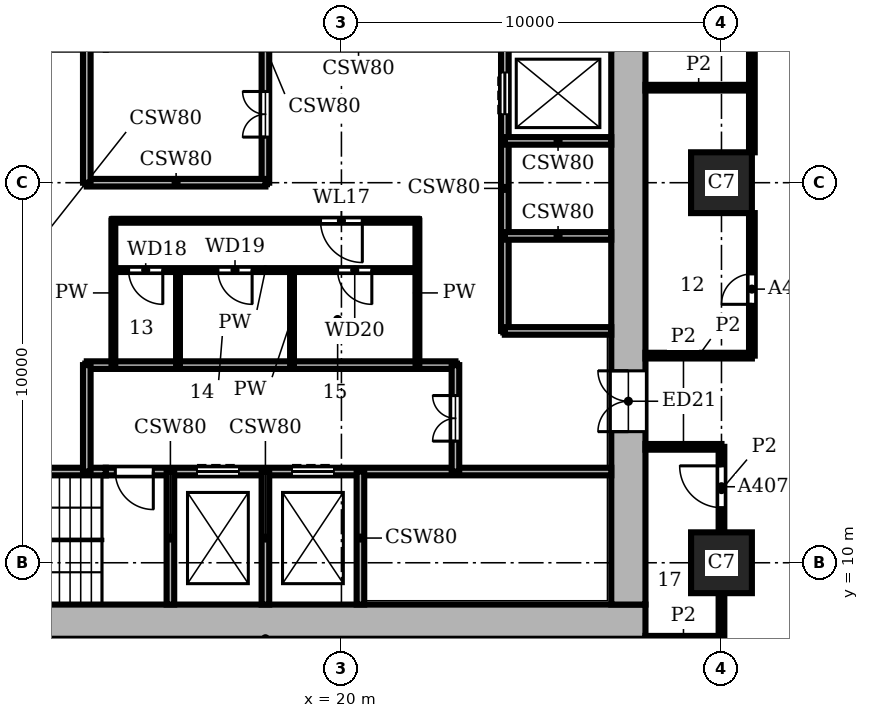
"""IFC4 building model, lengths in metres.
Left out: names, types, materials, properties, quantities, classifications, styles, units other than length and angle.
Written with IfcOpenShell. Run it as: python <this file> out.ifc"""

import sys

from ifc_helpers import new_model, si_unit, direction, frame, frame_2d, origin, origin_2d, place, context, subcontext, project, spatial, rectangle, extrude, element, fill, save


model = new_model("IFC4")
c1 = context("Model", 3, precision=1e-05, world=origin(), true_north=direction((0.0, 1.0)))
c2 = subcontext(c1, "Body", "Model", "MODEL_VIEW")
j1 = project(units=[si_unit("LENGTHUNIT", "METRE"), si_unit("PLANEANGLEUNIT", "RADIAN")], contexts=[c1])
p1 = place(None, origin())
s1 = spatial("IfcSite", under=j1, at=p1, CompositionType="ELEMENT")
p2 = place(p1, origin())
s2 = spatial("IfcBuilding", under=s1, at=p2, CompositionType="ELEMENT")
p3 = place(p2, frame((0.0, 0.0, 47.1)))
s3 = spatial("IfcBuildingStorey", under=s2, at=p3, CompositionType="ELEMENT", Elevation=47.1)
for number, where, z_axis, x_axis in (
    (1, (30.0, 10.0, 0.0), (0.0, 0.0, 1.0), (1.0, 0.0, 0.0)),
    (2, (30.0, 20.0, 0.0), (0.0, 0.0, 1.0), (1.0, 0.0, 0.0)),
):
    element("IfcColumn", number, at=place(p3, frame(where, z_axis=z_axis, x_axis=x_axis)), inside=s3, PredefinedType="COLUMN", context=c2, shape_type="SweptSolid", body=[
        extrude(rectangle(XDim=1.6, YDim=1.6, at=origin_2d()), origin(), (0.0, 0.0, 1.0), 3.9),
    ])
p4 = place(p3, frame((8.0, 8.45, 0.0), z_axis=(0.0, 0.0, 1.0), x_axis=(1.0, 0.0, 0.0)))
e3 = element("IfcWall", 3, at=p4, inside=s3, PredefinedType="SHEAR", context=c2, shape_type="SweptSolid", body=[
    extrude(rectangle(XDim=20.0, YDim=0.9, at=frame_2d((10.0, 0.0))), origin(), (0.0, 0.0, 1.0), 3.9),
])
p5 = place(p3, frame((27.55, 8.9, 0.0), z_axis=(0.0, 0.0, 1.0), x_axis=(0.0, 1.0, 0.0)))
e4 = element("IfcWall", 4, at=p5, inside=s3, PredefinedType="SHEAR", context=c2, shape_type="SweptSolid", body=[
    extrude(rectangle(XDim=18.2, YDim=0.9, at=frame_2d((9.1, 0.0))), origin(), (0.0, 0.0, 1.0), 3.9),
])
p6 = place(p5, frame((4.55, 0.0, 0.0)))
e5 = element("IfcOpeningElement", 5, at=p6, cuts=e4, PredefinedType="OPENING", context=c2, shape_type="SweptSolid", body=[
    extrude(rectangle(XDim=1.6, YDim=2.1, at=frame_2d((0.8, 1.05))), frame((0.0, 0.46, 0.0), z_axis=(0.0, -1.0, 0.0), x_axis=(1.0, 0.0, 0.0)), (0.0, 0.0, 1.0), 0.92),
])
p7 = place(p3, frame((8.9, 12.4, 0.0), z_axis=(0.0, 0.0, 1.0), x_axis=(1.0, 0.0, 0.0)))
e6 = element("IfcWall", 6, at=p7, inside=s3, PredefinedType="SHEAR", context=c2, shape_type="SweptSolid", body=[
    extrude(rectangle(XDim=4.9, YDim=0.2, at=frame_2d((2.45, 0.0))), origin(), (0.0, 0.0, 1.0), 3.58),
])
p8 = place(p3, frame((13.8, 12.4, 0.0), z_axis=(0.0, 0.0, 1.0), x_axis=(1.0, 0.0, 0.0)))
e7 = element("IfcWall", 7, at=p8, inside=s3, PredefinedType="SHEAR", context=c2, shape_type="SweptSolid", body=[
    extrude(rectangle(XDim=13.3, YDim=0.2, at=frame_2d((6.65, 0.0))), origin(), (0.0, 0.0, 1.0), 3.58),
])
p9 = place(p8, frame((2.4, 0.0, 0.0)))
e8 = element("IfcOpeningElement", 8, at=p9, cuts=e7, PredefinedType="OPENING", context=c2, shape_type="SweptSolid", body=[
    extrude(rectangle(XDim=1.1, YDim=2.1, at=frame_2d((0.55, 1.05))), frame((0.0, 0.11, 0.0), z_axis=(0.0, -1.0, 0.0), x_axis=(1.0, 0.0, 0.0)), (0.0, 0.0, 1.0), 0.22),
])
p10 = place(p8, frame((4.9, 0.0, 0.0)))
e9 = element("IfcOpeningElement", 9, at=p10, cuts=e7, PredefinedType="OPENING", context=c2, shape_type="SweptSolid", body=[
    extrude(rectangle(XDim=1.1, YDim=2.1, at=frame_2d((0.55, 1.05))), frame((0.0, 0.11, 0.0), z_axis=(0.0, -1.0, 0.0), x_axis=(1.0, 0.0, 0.0)), (0.0, 0.0, 1.0), 0.22),
])
p11 = place(p8, frame((0.25, 0.0, 0.0)))
e10 = element("IfcOpeningElement", 10, at=p11, cuts=e7, PredefinedType="OPENING", context=c2, shape_type="SweptSolid", body=[
    extrude(rectangle(XDim=1.0, YDim=2.1, at=frame_2d((0.5, 1.05))), frame((0.0, 0.11, 0.0), z_axis=(0.0, -1.0, 0.0), x_axis=(1.0, 0.0, 0.0)), (0.0, 0.0, 1.0), 0.22),
])
p12 = place(p3, frame((13.3, 15.2, 0.0), z_axis=(0.0, 0.0, 1.0), x_axis=(1.0, 0.0, 0.0)))
e11 = element("IfcWall", 11, at=p12, inside=s3, PredefinedType="SHEAR", context=c2, shape_type="SweptSolid", body=[
    extrude(rectangle(XDim=9.7, YDim=0.2, at=frame_2d((4.85, 0.0))), origin(), (0.0, 0.0, 1.0), 3.58),
])
p13 = place(p3, frame((24.3, 16.1, 0.0), z_axis=(0.0, 0.0, 1.0), x_axis=(1.0, 0.0, 0.0)))
e12 = element("IfcWall", 12, at=p13, inside=s3, PredefinedType="SHEAR", context=c2, shape_type="SweptSolid", body=[
    extrude(rectangle(XDim=2.8, YDim=0.2, at=frame_2d((1.4, 0.0))), origin(), (0.0, 0.0, 1.0), 3.58),
])
p14 = place(p3, frame((14.0, 17.7, 0.0), z_axis=(0.0, 0.0, 1.0), x_axis=(1.0, 0.0, 0.0)))
e13 = element("IfcWall", 13, at=p14, inside=s3, PredefinedType="PARTITIONING", context=c2, shape_type="SweptSolid", body=[
    extrude(rectangle(XDim=8.0, YDim=0.1, at=frame_2d((4.0, 0.0))), origin(), (0.0, 0.0, 1.0), 3.58),
])
p15 = place(p14, frame((0.4, 0.0, 0.0)))
e14 = element("IfcOpeningElement", 14, at=p15, cuts=e13, PredefinedType="OPENING", context=c2, shape_type="SweptSolid", body=[
    extrude(rectangle(XDim=0.9, YDim=2.1, at=frame_2d((0.45, 1.05))), frame((0.0, 0.06, 0.0), z_axis=(0.0, -1.0, 0.0), x_axis=(1.0, 0.0, 0.0)), (0.0, 0.0, 1.0), 0.12),
])
p16 = place(p14, frame((2.75, 0.0, 0.0)))
e15 = element("IfcOpeningElement", 15, at=p16, cuts=e13, PredefinedType="OPENING", context=c2, shape_type="SweptSolid", body=[
    extrude(rectangle(XDim=0.9, YDim=2.1, at=frame_2d((0.45, 1.05))), frame((0.0, 0.06, 0.0), z_axis=(0.0, -1.0, 0.0), x_axis=(1.0, 0.0, 0.0)), (0.0, 0.0, 1.0), 0.12),
])
p17 = place(p14, frame((5.9, 0.0, 0.0)))
e16 = element("IfcOpeningElement", 16, at=p17, cuts=e13, PredefinedType="OPENING", context=c2, shape_type="SweptSolid", body=[
    extrude(rectangle(XDim=0.9, YDim=2.1, at=frame_2d((0.45, 1.05))), frame((0.0, 0.06, 0.0), z_axis=(0.0, -1.0, 0.0), x_axis=(1.0, 0.0, 0.0)), (0.0, 0.0, 1.0), 0.12),
])
p18 = place(p3, frame((24.3, 18.6, 0.0), z_axis=(0.0, 0.0, 1.0), x_axis=(1.0, 0.0, 0.0)))
e17 = element("IfcWall", 17, at=p18, inside=s3, PredefinedType="SHEAR", context=c2, shape_type="SweptSolid", body=[
    extrude(rectangle(XDim=2.8, YDim=0.2, at=frame_2d((1.4, 0.0))), origin(), (0.0, 0.0, 1.0), 3.58),
])
p19 = place(p3, frame((14.0, 19.0, 0.0), z_axis=(0.0, 0.0, 1.0), x_axis=(1.0, 0.0, 0.0)))
e18 = element("IfcWall", 18, at=p19, inside=s3, PredefinedType="PARTITIONING", context=c2, shape_type="SweptSolid", body=[
    extrude(rectangle(XDim=8.0, YDim=0.1, at=frame_2d((4.0, 0.0))), origin(), (0.0, 0.0, 1.0), 3.58),
])
p20 = place(p19, frame((5.45, 0.0, 0.0)))
e19 = element("IfcOpeningElement", 19, at=p20, cuts=e18, PredefinedType="OPENING", context=c2, shape_type="SweptSolid", body=[
    extrude(rectangle(XDim=1.1, YDim=2.1, at=frame_2d((0.55, 1.05))), frame((0.0, 0.06, 0.0), z_axis=(0.0, -1.0, 0.0), x_axis=(1.0, 0.0, 0.0)), (0.0, 0.0, 1.0), 0.12),
])
p21 = place(p3, frame((13.3, 20.0, 0.0), z_axis=(0.0, 0.0, 1.0), x_axis=(1.0, 0.0, 0.0)))
e20 = element("IfcWall", 20, at=p21, inside=s3, PredefinedType="SHEAR", context=c2, shape_type="SweptSolid", body=[
    extrude(rectangle(XDim=4.7, YDim=0.2, at=frame_2d((2.35, 0.0))), origin(), (0.0, 0.0, 1.0), 3.58),
])
for number, where, z_axis, x_axis in (
    (21, (24.3, 21.1, 0.0), (0.0, 0.0, 1.0), (1.0, 0.0, 0.0)),
    (22, (13.3, 12.4, 0.0), (0.0, 0.0, 1.0), (0.0, 1.0, 0.0)),
):
    element("IfcWall", number, at=place(p3, frame(where, z_axis=z_axis, x_axis=x_axis)), inside=s3, PredefinedType="SHEAR", context=c2, shape_type="SweptSolid", body=[
        extrude(rectangle(XDim=2.8, YDim=0.2, at=frame_2d((1.4, 0.0))), origin(), (0.0, 0.0, 1.0), 3.58),
    ])
p22 = place(p3, frame((13.3, 20.0, 0.0), z_axis=(0.0, 0.0, 1.0), x_axis=(0.0, 1.0, 0.0)))
e23 = element("IfcWall", 23, at=p22, inside=s3, PredefinedType="SHEAR", context=c2, shape_type="SweptSolid", body=[
    extrude(rectangle(XDim=3.6, YDim=0.2, at=frame_2d((1.8, 0.0))), origin(), (0.0, 0.0, 1.0), 3.58),
])
p23 = place(p3, frame((14.0, 15.2, 0.0), z_axis=(0.0, 0.0, 1.0), x_axis=(0.0, 1.0, 0.0)))
e24 = element("IfcWall", 24, at=p23, inside=s3, PredefinedType="PARTITIONING", context=c2, shape_type="SweptSolid", body=[
    extrude(rectangle(XDim=3.8, YDim=0.1, at=frame_2d((1.9, 0.0))), origin(), (0.0, 0.0, 1.0), 3.58),
])
p24 = place(p3, frame((15.5, 8.9, 0.0), z_axis=(0.0, 0.0, 1.0), x_axis=(0.0, 1.0, 0.0)))
e25 = element("IfcWall", 25, at=p24, inside=s3, PredefinedType="SHEAR", context=c2, shape_type="SweptSolid", body=[
    extrude(rectangle(XDim=3.5, YDim=0.2, at=frame_2d((1.75, 0.0))), origin(), (0.0, 0.0, 1.0), 3.58),
])
p25 = place(p3, frame((15.7, 15.2, 0.0), z_axis=(0.0, 0.0, 1.0), x_axis=(0.0, 1.0, 0.0)))
e26 = element("IfcWall", 26, at=p25, inside=s3, PredefinedType="PARTITIONING", context=c2, shape_type="SweptSolid", body=[
    extrude(rectangle(XDim=2.5, YDim=0.1, at=frame_2d((1.25, 0.0))), origin(), (0.0, 0.0, 1.0), 3.58),
])
p26 = place(p3, frame((18.0, 8.9, 0.0), z_axis=(0.0, 0.0, 1.0), x_axis=(0.0, 1.0, 0.0)))
e27 = element("IfcWall", 27, at=p26, inside=s3, PredefinedType="SHEAR", context=c2, shape_type="SweptSolid", body=[
    extrude(rectangle(XDim=3.5, YDim=0.2, at=frame_2d((1.75, 0.0))), origin(), (0.0, 0.0, 1.0), 3.58),
])
p27 = place(p3, frame((18.0, 20.0, 0.0), z_axis=(0.0, 0.0, 1.0), x_axis=(0.0, 1.0, 0.0)))
e28 = element("IfcWall", 28, at=p27, inside=s3, PredefinedType="SHEAR", context=c2, shape_type="SweptSolid", body=[
    extrude(rectangle(XDim=7.1, YDim=0.2, at=frame_2d((3.55, 0.0))), origin(), (0.0, 0.0, 1.0), 3.58),
])
p28 = place(p27, frame((1.2, 0.0, 0.0)))
e29 = element("IfcOpeningElement", 29, at=p28, cuts=e28, PredefinedType="OPENING", context=c2, shape_type="SweptSolid", body=[
    extrude(rectangle(XDim=1.2, YDim=2.1, at=frame_2d((0.6, 1.05))), frame((0.0, 0.11, 0.0), z_axis=(0.0, -1.0, 0.0), x_axis=(1.0, 0.0, 0.0)), (0.0, 0.0, 1.0), 0.22),
])
p29 = place(p3, frame((18.7, 15.2, 0.0), z_axis=(0.0, 0.0, 1.0), x_axis=(0.0, 1.0, 0.0)))
e30 = element("IfcWall", 30, at=p29, inside=s3, PredefinedType="PARTITIONING", context=c2, shape_type="SweptSolid", body=[
    extrude(rectangle(XDim=2.5, YDim=0.1, at=frame_2d((1.25, 0.0))), origin(), (0.0, 0.0, 1.0), 3.58),
])
p30 = place(p3, frame((20.5, 8.9, 0.0), z_axis=(0.0, 0.0, 1.0), x_axis=(0.0, 1.0, 0.0)))
e31 = element("IfcWall", 31, at=p30, inside=s3, PredefinedType="SHEAR", context=c2, shape_type="SweptSolid", body=[
    extrude(rectangle(XDim=3.5, YDim=0.2, at=frame_2d((1.75, 0.0))), origin(), (0.0, 0.0, 1.0), 3.58),
])
p31 = place(p3, frame((22.0, 15.2, 0.0), z_axis=(0.0, 0.0, 1.0), x_axis=(0.0, 1.0, 0.0)))
e32 = element("IfcWall", 32, at=p31, inside=s3, PredefinedType="PARTITIONING", context=c2, shape_type="SweptSolid", body=[
    extrude(rectangle(XDim=3.8, YDim=0.1, at=frame_2d((1.9, 0.0))), origin(), (0.0, 0.0, 1.0), 3.58),
])
p32 = place(p3, frame((23.0, 12.4, 0.0), z_axis=(0.0, 0.0, 1.0), x_axis=(0.0, 1.0, 0.0)))
e33 = element("IfcWall", 33, at=p32, inside=s3, PredefinedType="SHEAR", context=c2, shape_type="SweptSolid", body=[
    extrude(rectangle(XDim=2.8, YDim=0.2, at=frame_2d((1.4, 0.0))), origin(), (0.0, 0.0, 1.0), 3.58),
])
p33 = place(p32, frame((0.8, 0.0, 0.0)))
e34 = element("IfcOpeningElement", 34, at=p33, cuts=e33, PredefinedType="OPENING", context=c2, shape_type="SweptSolid", body=[
    extrude(rectangle(XDim=1.2, YDim=2.1, at=frame_2d((0.6, 1.05))), frame((0.0, 0.11, 0.0), z_axis=(0.0, -1.0, 0.0), x_axis=(1.0, 0.0, 0.0)), (0.0, 0.0, 1.0), 0.22),
])
p34 = place(p3, frame((24.3, 16.1, 0.0), z_axis=(0.0, 0.0, 1.0), x_axis=(0.0, 1.0, 0.0)))
e35 = element("IfcWall", 35, at=p34, inside=s3, PredefinedType="SHEAR", context=c2, shape_type="SweptSolid", body=[
    extrude(rectangle(XDim=7.5, YDim=0.2, at=frame_2d((3.75, 0.0))), origin(), (0.0, 0.0, 1.0), 3.58),
])
p35 = place(p34, frame((5.7, 0.0, 0.0)))
e36 = element("IfcOpeningElement", 36, at=p35, cuts=e35, PredefinedType="OPENING", context=c2, shape_type="SweptSolid", body=[
    extrude(rectangle(XDim=1.1, YDim=2.1, at=frame_2d((0.55, 1.05))), frame((0.0, 0.11, 0.0), z_axis=(0.0, -1.0, 0.0), x_axis=(1.0, 0.0, 0.0)), (0.0, 0.0, 1.0), 0.22),
])
p36 = place(p3, frame((30.0, 8.0, 0.0), z_axis=(0.0, 0.0, 1.0), x_axis=(0.0, 1.0, 0.0)))
e37 = element("IfcWall", 37, at=p36, inside=s3, PredefinedType="PARTITIONING", context=c2, shape_type="SweptSolid", body=[
    extrude(rectangle(XDim=1.2, YDim=0.15, at=frame_2d((0.6, 0.0))), origin(), (0.0, 0.0, 1.0), 3.58),
])
p37 = place(p3, frame((30.0, 10.8, 0.0), z_axis=(0.0, 0.0, 1.0), x_axis=(0.0, 1.0, 0.0)))
e38 = element("IfcWall", 38, at=p37, inside=s3, PredefinedType="PARTITIONING", context=c2, shape_type="SweptSolid", body=[
    extrude(rectangle(XDim=2.25, YDim=0.15, at=frame_2d((1.125, 0.0))), origin(), (0.0, 0.0, 1.0), 3.58),
])
p38 = place(p37, frame((0.65, 0.0, 0.0)))
e39 = element("IfcOpeningElement", 39, at=p38, cuts=e38, PredefinedType="OPENING", context=c2, shape_type="SweptSolid", body=[
    extrude(rectangle(XDim=1.1, YDim=2.1, at=frame_2d((0.55, 1.05))), frame((0.0, 0.085, 0.0), z_axis=(0.0, -1.0, 0.0), x_axis=(1.0, 0.0, 0.0)), (0.0, 0.0, 1.0), 0.17),
])
p39 = place(p3, frame((30.8, 15.45, 0.0), z_axis=(0.0, 0.0, 1.0), x_axis=(0.0, 1.0, 0.0)))
e40 = element("IfcWall", 40, at=p39, inside=s3, PredefinedType="PARTITIONING", context=c2, shape_type="SweptSolid", body=[
    extrude(rectangle(XDim=3.75, YDim=0.15, at=frame_2d((1.875, 0.0))), origin(), (0.0, 0.0, 1.0), 3.58),
])
p40 = place(p39, frame((1.35, 0.0, 0.0)))
e41 = element("IfcOpeningElement", 41, at=p40, cuts=e40, PredefinedType="OPENING", context=c2, shape_type="SweptSolid", body=[
    extrude(rectangle(XDim=0.8, YDim=2.1, at=frame_2d((0.4, 1.05))), frame((0.0, 0.085, 0.0), z_axis=(0.0, -1.0, 0.0), x_axis=(1.0, 0.0, 0.0)), (0.0, 0.0, 1.0), 0.17),
])
p41 = place(p3, frame((30.8, 20.8, 0.0), z_axis=(0.0, 0.0, 1.0), x_axis=(0.0, 1.0, 0.0)))
e42 = element("IfcWall", 42, at=p41, inside=s3, PredefinedType="PARTITIONING", context=c2, shape_type="SweptSolid", body=[
    extrude(rectangle(XDim=8.4, YDim=0.15, at=frame_2d((4.2, 0.0))), origin(), (0.0, 0.0, 1.0), 3.58),
])
p42 = place(p41, frame((3.55, 0.0, 0.0)))
e43 = element("IfcOpeningElement", 43, at=p42, cuts=e42, PredefinedType="OPENING", context=c2, shape_type="SweptSolid", body=[
    extrude(rectangle(XDim=1.1, YDim=2.1, at=frame_2d((0.55, 1.05))), frame((0.0, 0.085, 0.0), z_axis=(0.0, -1.0, 0.0), x_axis=(1.0, 0.0, 0.0)), (0.0, 0.0, 1.0), 0.17),
])
for number, where, z_axis, x_axis in (
    (44, (28.0, 8.0, 0.0), (0.0, 0.0, 1.0), (1.0, 0.0, 0.0)),
    (45, (28.0, 13.05, 0.0), (0.0, 0.0, 1.0), (1.0, 0.0, 0.0)),
):
    element("IfcWall", number, at=place(p3, frame(where, z_axis=z_axis, x_axis=x_axis)), inside=s3, PredefinedType="PARTITIONING", context=c2, shape_type="SweptSolid", body=[
        extrude(rectangle(XDim=2.0, YDim=0.15, at=frame_2d((1.0, 0.0))), origin(), (0.0, 0.0, 1.0), 3.58),
    ])
for number, where, z_axis, x_axis in (
    (46, (28.0, 15.45, 0.0), (0.0, 0.0, 1.0), (1.0, 0.0, 0.0)),
    (47, (28.0, 22.5, 0.0), (0.0, 0.0, 1.0), (1.0, 0.0, 0.0)),
):
    element("IfcWall", number, at=place(p3, frame(where, z_axis=z_axis, x_axis=x_axis)), inside=s3, PredefinedType="PARTITIONING", context=c2, shape_type="SweptSolid", body=[
        extrude(rectangle(XDim=2.8, YDim=0.15, at=frame_2d((1.4, 0.0))), origin(), (0.0, 0.0, 1.0), 3.58),
    ])
p43 = place(p35, origin())
e48 = element("IfcDoor", 48, at=p43, inside=s3, OperationType="DOUBLE_DOOR_SLIDING", PredefinedType="DOOR", context=c2, shape_type="SweptSolid", body=[
    extrude(rectangle(XDim=1.1, YDim=2.1, at=frame_2d((0.55, 1.05))), frame((0.0, 0.025, 0.0), z_axis=(0.0, -1.0, 0.0), x_axis=(1.0, 0.0, 0.0)), (0.0, 0.0, 1.0), 0.05),
])
fill(e36, e48)
p44 = place(p9, origin())
e49 = element("IfcDoor", 49, at=p44, inside=s3, OperationType="DOUBLE_DOOR_SLIDING", PredefinedType="DOOR", context=c2, shape_type="SweptSolid", body=[
    extrude(rectangle(XDim=1.1, YDim=2.1, at=frame_2d((0.55, 1.05))), frame((0.0, 0.025, 0.0), z_axis=(0.0, -1.0, 0.0), x_axis=(1.0, 0.0, 0.0)), (0.0, 0.0, 1.0), 0.05),
])
fill(e8, e49)
p45 = place(p10, origin())
e50 = element("IfcDoor", 50, at=p45, inside=s3, OperationType="DOUBLE_DOOR_SLIDING", PredefinedType="DOOR", context=c2, shape_type="SweptSolid", body=[
    extrude(rectangle(XDim=1.1, YDim=2.1, at=frame_2d((0.55, 1.05))), frame((0.0, 0.025, 0.0), z_axis=(0.0, -1.0, 0.0), x_axis=(1.0, 0.0, 0.0)), (0.0, 0.0, 1.0), 0.05),
])
fill(e9, e50)
p46 = place(p11, frame((1.0, 0.0, 0.0), z_axis=(0.0, 0.0, 1.0), x_axis=(-1.0, 0.0, 0.0)))
e51 = element("IfcDoor", 51, at=p46, inside=s3, OperationType="SINGLE_SWING_LEFT", PredefinedType="DOOR", context=c2, shape_type="SweptSolid", body=[
    extrude(rectangle(XDim=1.0, YDim=2.1, at=frame_2d((0.5, 1.05))), frame((0.0, 0.025, 0.0), z_axis=(0.0, -1.0, 0.0), x_axis=(1.0, 0.0, 0.0)), (0.0, 0.0, 1.0), 0.05),
])
fill(e10, e51)
p47 = place(p33, origin())
e52 = element("IfcDoor", 52, at=p47, inside=s3, OperationType="DOUBLE_DOOR_SINGLE_SWING", PredefinedType="DOOR", context=c2, shape_type="SweptSolid", body=[
    extrude(rectangle(XDim=1.2, YDim=2.1, at=frame_2d((0.6, 1.05))), frame((0.0, 0.025, 0.0), z_axis=(0.0, -1.0, 0.0), x_axis=(1.0, 0.0, 0.0)), (0.0, 0.0, 1.0), 0.05),
])
fill(e34, e52)
p48 = place(p28, origin())
e53 = element("IfcDoor", 53, at=p48, inside=s3, OperationType="DOUBLE_DOOR_SINGLE_SWING", PredefinedType="DOOR", context=c2, shape_type="SweptSolid", body=[
    extrude(rectangle(XDim=1.2, YDim=2.1, at=frame_2d((0.6, 1.05))), frame((0.0, 0.025, 0.0), z_axis=(0.0, -1.0, 0.0), x_axis=(1.0, 0.0, 0.0)), (0.0, 0.0, 1.0), 0.05),
])
fill(e29, e53)
p49 = place(p20, frame((1.1, 0.0, 0.0), z_axis=(0.0, 0.0, 1.0), x_axis=(-1.0, 0.0, 0.0)))
e54 = element("IfcDoor", 54, at=p49, inside=s3, OperationType="SINGLE_SWING_LEFT", PredefinedType="DOOR", context=c2, shape_type="SweptSolid", body=[
    extrude(rectangle(XDim=1.1, YDim=2.1, at=frame_2d((0.55, 1.05))), frame((0.0, 0.025, 0.0), z_axis=(0.0, -1.0, 0.0), x_axis=(1.0, 0.0, 0.0)), (0.0, 0.0, 1.0), 0.05),
])
fill(e19, e54)
p50 = place(p15, frame((0.9, 0.0, 0.0), z_axis=(0.0, 0.0, 1.0), x_axis=(-1.0, 0.0, 0.0)))
e55 = element("IfcDoor", 55, at=p50, inside=s3, OperationType="SINGLE_SWING_LEFT", PredefinedType="DOOR", context=c2, shape_type="SweptSolid", body=[
    extrude(rectangle(XDim=0.9, YDim=2.1, at=frame_2d((0.45, 1.05))), frame((0.0, 0.025, 0.0), z_axis=(0.0, -1.0, 0.0), x_axis=(1.0, 0.0, 0.0)), (0.0, 0.0, 1.0), 0.05),
])
fill(e14, e55)
p51 = place(p16, frame((0.9, 0.0, 0.0), z_axis=(0.0, 0.0, 1.0), x_axis=(-1.0, 0.0, 0.0)))
e56 = element("IfcDoor", 56, at=p51, inside=s3, OperationType="SINGLE_SWING_LEFT", PredefinedType="DOOR", context=c2, shape_type="SweptSolid", body=[
    extrude(rectangle(XDim=0.9, YDim=2.1, at=frame_2d((0.45, 1.05))), frame((0.0, 0.025, 0.0), z_axis=(0.0, -1.0, 0.0), x_axis=(1.0, 0.0, 0.0)), (0.0, 0.0, 1.0), 0.05),
])
fill(e15, e56)
p52 = place(p17, frame((0.9, 0.0, 0.0), z_axis=(0.0, 0.0, 1.0), x_axis=(-1.0, 0.0, 0.0)))
e57 = element("IfcDoor", 57, at=p52, inside=s3, OperationType="SINGLE_SWING_LEFT", PredefinedType="DOOR", context=c2, shape_type="SweptSolid", body=[
    extrude(rectangle(XDim=0.9, YDim=2.1, at=frame_2d((0.45, 1.05))), frame((0.0, 0.025, 0.0), z_axis=(0.0, -1.0, 0.0), x_axis=(1.0, 0.0, 0.0)), (0.0, 0.0, 1.0), 0.05),
])
fill(e16, e57)
p53 = place(p6, origin())
e58 = element("IfcDoor", 58, at=p53, inside=s3, OperationType="DOUBLE_DOOR_SINGLE_SWING", PredefinedType="DOOR", context=c2, shape_type="SweptSolid", body=[
    extrude(rectangle(XDim=1.6, YDim=2.1, at=frame_2d((0.8, 1.05))), frame((0.0, 0.025, 0.0), z_axis=(0.0, -1.0, 0.0), x_axis=(1.0, 0.0, 0.0)), (0.0, 0.0, 1.0), 0.05),
])
fill(e5, e58)
p54 = place(p38, origin())
e59 = element("IfcDoor", 59, at=p54, inside=s3, OperationType="SINGLE_SWING_RIGHT", PredefinedType="DOOR", context=c2, shape_type="SweptSolid", body=[
    extrude(rectangle(XDim=1.1, YDim=2.1, at=frame_2d((0.55, 1.05))), frame((0.0, 0.025, 0.0), z_axis=(0.0, -1.0, 0.0), x_axis=(1.0, 0.0, 0.0)), (0.0, 0.0, 1.0), 0.05),
])
fill(e39, e59)
p55 = place(p40, origin())
e60 = element("IfcDoor", 60, at=p55, inside=s3, OperationType="SINGLE_SWING_LEFT", PredefinedType="DOOR", context=c2, shape_type="SweptSolid", body=[
    extrude(rectangle(XDim=0.8, YDim=2.1, at=frame_2d((0.4, 1.05))), frame((0.0, 0.025, 0.0), z_axis=(0.0, -1.0, 0.0), x_axis=(1.0, 0.0, 0.0)), (0.0, 0.0, 1.0), 0.05),
])
fill(e41, e60)
save(model, sys.argv[1])
